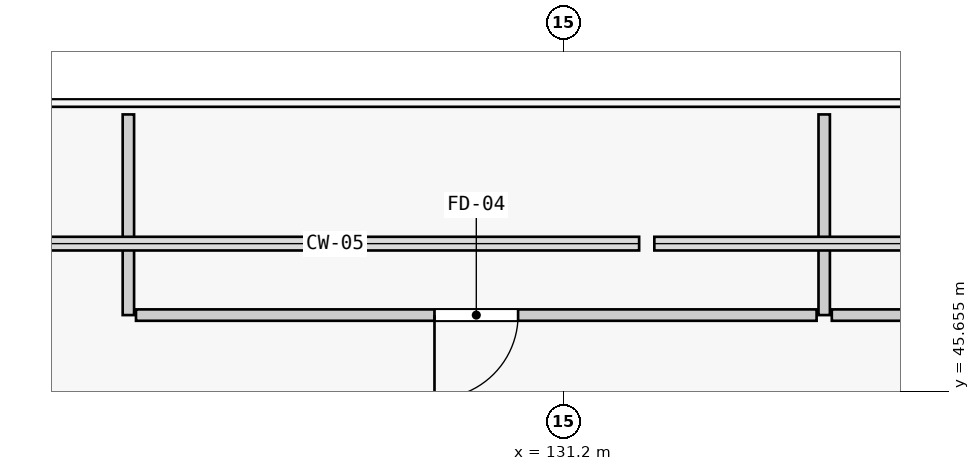
"""IFC4 building model, lengths in metres.
Left out: names, types, materials, properties, quantities, classifications, styles, units other than length and angle.
Written with IfcOpenShell. Run it as: python <this file> out.ifc"""

import sys

from ifc_helpers import new_model, si_unit, direction, frame, frame_2d, origin, place, context, subcontext, project, spatial, rectangle, extrude, element, fill, save


model = new_model("IFC4")
c1 = context("Model", 3, precision=1e-05, world=origin(), true_north=direction((0.0, 1.0)))
c2 = subcontext(c1, "Body", "Model", "MODEL_VIEW")
j1 = project(units=[si_unit("LENGTHUNIT", "METRE"), si_unit("PLANEANGLEUNIT", "RADIAN")], contexts=[c1])
p1 = place(None, origin())
s1 = spatial("IfcSite", under=j1, at=p1, CompositionType="ELEMENT")
p2 = place(p1, origin())
s2 = spatial("IfcBuilding", under=s1, at=p2, CompositionType="ELEMENT")
p3 = place(p2, frame((0.0, 0.0, 5.4)))
s3 = spatial("IfcBuildingStorey", under=s2, at=p3, CompositionType="ELEMENT", Elevation=5.4)
for number, where, z_axis, x_axis in (
    (1, (125.48, 46.66, 0.0), (0.0, 0.0, 1.0), (0.0, 1.0, 0.0)),
    (2, (134.635, 49.3, 0.0), (0.0, 0.0, 1.0), (0.0, -1.0, 0.0)),
):
    element("IfcWall", number, at=place(p3, frame(where, z_axis=z_axis, x_axis=x_axis)), inside=s3, PredefinedType="PARTITIONING", context=c2, shape_type="SweptSolid", body=[
        extrude(rectangle(XDim=2.64, YDim=0.15, at=frame_2d((1.32, 0.0))), origin(), (0.0, 0.0, 1.0), 3.94),
    ])
p4 = place(p3, frame((134.535, 46.66, 0.0), z_axis=(0.0, 0.0, 1.0), x_axis=(-1.0, 0.0, 0.0)))
e3 = element("IfcWall", 3, at=p4, inside=s3, PredefinedType="PARTITIONING", context=c2, shape_type="SweptSolid", body=[
    extrude(rectangle(XDim=8.955, YDim=0.15, at=frame_2d((4.478, 0.0))), origin(), (0.0, 0.0, 1.0), 3.94),
])
p5 = place(p4, frame((3.927, 0.0, 0.0)))
e4 = element("IfcOpeningElement", 4, at=p5, cuts=e3, PredefinedType="OPENING", context=c2, shape_type="SweptSolid", body=[
    extrude(rectangle(XDim=1.1, YDim=2.15, at=frame_2d((0.55, 1.075))), frame((0.0, 0.085, 0.0), z_axis=(0.0, -1.0, 0.0), x_axis=(1.0, 0.0, 0.0)), (0.0, 0.0, 1.0), 0.17),
])
p6 = place(p3, frame((156.7, 46.66, 0.0), z_axis=(0.0, 0.0, 1.0), x_axis=(-1.0, 0.0, 0.0)))
e5 = element("IfcWall", 5, at=p6, inside=s3, PredefinedType="PARTITIONING", context=c2, shape_type="SweptSolid", body=[
    extrude(rectangle(XDim=21.965, YDim=0.15, at=frame_2d((10.982, 0.0))), origin(), (0.0, 0.0, 1.0), 3.94),
])
p7 = place(p6, frame((10.433, 0.0, 0.0)))
e6 = element("IfcOpeningElement", 6, at=p7, cuts=e5, PredefinedType="OPENING", context=c2, shape_type="SweptSolid", body=[
    extrude(rectangle(XDim=1.1, YDim=2.2, at=frame_2d((0.55, 1.1))), frame((0.0, 0.085, 0.0), z_axis=(0.0, -1.0, 0.0), x_axis=(1.0, 0.0, 0.0)), (0.0, 0.0, 1.0), 0.17),
])
p8 = place(p6, frame((15.893, 0.0, 1.05)))
e7 = element("IfcOpeningElement", 7, at=p8, cuts=e5, PredefinedType="OPENING", context=c2, shape_type="SweptSolid", body=[
    extrude(rectangle(XDim=1.6, YDim=1.5, at=frame_2d((0.8, 0.75))), frame((0.0, 0.085, 0.0), z_axis=(0.0, -1.0, 0.0), x_axis=(1.0, 0.0, 0.0)), (0.0, 0.0, 1.0), 0.17),
])
p9 = place(p5, origin())
e8 = element("IfcDoor", 8, at=p9, inside=s3, OperationType="SINGLE_SWING_RIGHT", PredefinedType="DOOR", context=c2, shape_type="SweptSolid", body=[
    extrude(rectangle(XDim=1.1, YDim=2.15, at=frame_2d((0.55, 1.075))), frame((0.0, 0.025, 0.0), z_axis=(0.0, -1.0, 0.0), x_axis=(1.0, 0.0, 0.0)), (0.0, 0.0, 1.0), 0.05),
])
fill(e4, e8)
save(model, sys.argv[1])
